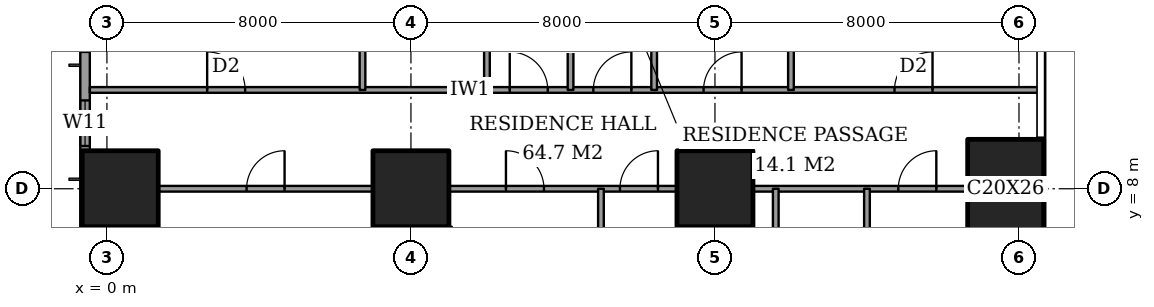
"""IFC4 building model, lengths in metres.
Left out: names, types, materials, properties, quantities, classifications, styles, units other than length and angle.
Written with IfcOpenShell. Run it as: python <this file> out.ifc"""

import sys

from ifc_helpers import new_model, si_unit, direction, frame, frame_2d, origin, origin_2d, place, context, subcontext, project, spatial, rectangle, extrude, element, fill, save


model = new_model("IFC4")
c1 = context("Model", 3, precision=1e-05, world=origin(), true_north=direction((0.0, 1.0)))
c2 = subcontext(c1, "Body", "Model", "MODEL_VIEW")
j1 = project(units=[si_unit("LENGTHUNIT", "METRE"), si_unit("PLANEANGLEUNIT", "RADIAN")], contexts=[c1])
p1 = place(None, origin())
s1 = spatial("IfcSite", under=j1, at=p1, CompositionType="ELEMENT")
p2 = place(p1, origin())
s2 = spatial("IfcBuilding", under=s1, at=p2, CompositionType="ELEMENT")
p3 = place(p2, frame((0.0, 0.0, 135.8)))
s3 = spatial("IfcBuildingStorey", under=s2, at=p3, CompositionType="ELEMENT", Elevation=135.8)
for number, where, z_axis, x_axis in (
    (1, (0.35, 8.0, 0.0), (0.0, 0.0, 1.0), (1.0, 0.0, 0.0)),
    (2, (8.0, 8.0, 0.0), (0.0, 0.0, 1.0), (1.0, 0.0, 0.0)),
    (3, (16.0, 8.0, 0.0), (0.0, 0.0, 1.0), (1.0, 0.0, 0.0)),
):
    element("IfcColumn", number, at=place(p3, frame(where, z_axis=z_axis, x_axis=x_axis)), inside=s3, PredefinedType="COLUMN", context=c2, shape_type="SweptSolid", body=[
        extrude(rectangle(XDim=2.0, YDim=2.0, at=origin_2d()), origin(), (0.0, 0.0, 1.0), 3.6),
    ])
p4 = place(p3, frame((23.65, 8.0, 0.0), z_axis=(0.0, 0.0, 1.0), x_axis=(1.0, 0.0, 0.0)))
e4 = element("IfcColumn", 4, at=p4, inside=s3, PredefinedType="COLUMN", context=c2, shape_type="SweptSolid", body=[
    extrude(rectangle(XDim=2.0, YDim=2.6, at=origin_2d()), origin(), (0.0, 0.0, 1.0), 3.6),
])
p5 = place(p3, frame((-0.575, 44.825, 0.0), z_axis=(0.0, 0.0, 1.0), x_axis=(0.0, -1.0, 0.0)))
e5 = element("IfcWall", 5, at=p5, inside=s3, PredefinedType="SOLIDWALL", context=c2, shape_type="SweptSolid", body=[
    extrude(rectangle(XDim=41.65, YDim=0.25, at=frame_2d((20.825, 0.0))), origin(), (0.0, 0.0, 1.0), 3.6),
])
p6 = place(p5, frame((0.775, 0.0, 0.4)))
e6 = element("IfcOpeningElement", 6, at=p6, cuts=e5, PredefinedType="OPENING", context=c2, shape_type="SweptSolid", body=[
    extrude(rectangle(XDim=2.4, YDim=2.2, at=frame_2d((1.2, 1.1))), frame((0.0, 0.135, 0.0), z_axis=(0.0, -1.0, 0.0), x_axis=(1.0, 0.0, 0.0)), (0.0, 0.0, 1.0), 0.27),
])
p7 = place(p5, frame((6.1, 0.0, 0.4)))
e7 = element("IfcOpeningElement", 7, at=p7, cuts=e5, PredefinedType="OPENING", context=c2, shape_type="SweptSolid", body=[
    extrude(rectangle(XDim=1.2, YDim=2.2, at=frame_2d((0.6, 1.1))), frame((0.0, 0.135, 0.0), z_axis=(0.0, -1.0, 0.0), x_axis=(1.0, 0.0, 0.0)), (0.0, 0.0, 1.0), 0.27),
])
p8 = place(p5, frame((8.425, 0.0, 0.4)))
e8 = element("IfcOpeningElement", 8, at=p8, cuts=e5, PredefinedType="OPENING", context=c2, shape_type="SweptSolid", body=[
    extrude(rectangle(XDim=2.4, YDim=2.2, at=frame_2d((1.2, 1.1))), frame((0.0, 0.135, 0.0), z_axis=(0.0, -1.0, 0.0), x_axis=(1.0, 0.0, 0.0)), (0.0, 0.0, 1.0), 0.27),
])
p9 = place(p5, frame((15.625, 0.0, 0.4)))
e9 = element("IfcOpeningElement", 9, at=p9, cuts=e5, PredefinedType="OPENING", context=c2, shape_type="SweptSolid", body=[
    extrude(rectangle(XDim=2.4, YDim=2.2, at=frame_2d((1.2, 1.1))), frame((0.0, 0.135, 0.0), z_axis=(0.0, -1.0, 0.0), x_axis=(1.0, 0.0, 0.0)), (0.0, 0.0, 1.0), 0.27),
])
p10 = place(p5, frame((23.625, 0.0, 0.4)))
e10 = element("IfcOpeningElement", 10, at=p10, cuts=e5, PredefinedType="OPENING", context=c2, shape_type="SweptSolid", body=[
    extrude(rectangle(XDim=2.4, YDim=2.2, at=frame_2d((1.2, 1.1))), frame((0.0, 0.135, 0.0), z_axis=(0.0, -1.0, 0.0), x_axis=(1.0, 0.0, 0.0)), (0.0, 0.0, 1.0), 0.27),
])
p11 = place(p5, frame((30.825, 0.0, 0.4)))
e11 = element("IfcOpeningElement", 11, at=p11, cuts=e5, PredefinedType="OPENING", context=c2, shape_type="SweptSolid", body=[
    extrude(rectangle(XDim=2.4, YDim=2.2, at=frame_2d((1.2, 1.1))), frame((0.0, 0.135, 0.0), z_axis=(0.0, -1.0, 0.0), x_axis=(1.0, 0.0, 0.0)), (0.0, 0.0, 1.0), 0.27),
])
p12 = place(p5, frame((34.5, 0.0, 0.4)))
e12 = element("IfcOpeningElement", 12, at=p12, cuts=e5, PredefinedType="OPENING", context=c2, shape_type="SweptSolid", body=[
    extrude(rectangle(XDim=1.2, YDim=2.2, at=frame_2d((0.6, 1.1))), frame((0.0, 0.135, 0.0), z_axis=(0.0, -1.0, 0.0), x_axis=(1.0, 0.0, 0.0)), (0.0, 0.0, 1.0), 0.27),
])
p13 = place(p5, frame((38.475, 0.0, 0.4)))
e13 = element("IfcOpeningElement", 13, at=p13, cuts=e5, PredefinedType="OPENING", context=c2, shape_type="SweptSolid", body=[
    extrude(rectangle(XDim=2.4, YDim=2.2, at=frame_2d((1.2, 1.1))), frame((0.0, 0.135, 0.0), z_axis=(0.0, -1.0, 0.0), x_axis=(1.0, 0.0, 0.0)), (0.0, 0.0, 1.0), 0.27),
])
p14 = place(p3, frame((1.35, 8.0, 0.0), z_axis=(0.0, 0.0, 1.0), x_axis=(1.0, 0.0, 0.0)))
e14 = element("IfcWall", 14, at=p14, inside=s3, PredefinedType="PARTITIONING", context=c2, shape_type="SweptSolid", body=[
    extrude(rectangle(XDim=5.65, YDim=0.15, at=frame_2d((2.825, 0.0))), origin(), (0.0, 0.0, 1.0), 3.35),
])
p15 = place(p14, frame((2.325, 0.0, 0.0)))
e15 = element("IfcOpeningElement", 15, at=p15, cuts=e14, PredefinedType="OPENING", context=c2, shape_type="SweptSolid", body=[
    extrude(rectangle(XDim=1.0, YDim=2.1, at=frame_2d((0.5, 1.05))), frame((0.0, 0.085, 0.0), z_axis=(0.0, -1.0, 0.0), x_axis=(1.0, 0.0, 0.0)), (0.0, 0.0, 1.0), 0.17),
])
p16 = place(p3, frame((9.0, 8.0, 0.0), z_axis=(0.0, 0.0, 1.0), x_axis=(1.0, 0.0, 0.0)))
e16 = element("IfcWall", 16, at=p16, inside=s3, PredefinedType="PARTITIONING", context=c2, shape_type="SweptSolid", body=[
    extrude(rectangle(XDim=6.0, YDim=0.15, at=frame_2d((3.0, 0.0))), origin(), (0.0, 0.0, 1.0), 3.35),
])
p17 = place(p16, frame((1.5, 0.0, 0.0)))
e17 = element("IfcOpeningElement", 17, at=p17, cuts=e16, PredefinedType="OPENING", context=c2, shape_type="SweptSolid", body=[
    extrude(rectangle(XDim=1.0, YDim=2.1, at=frame_2d((0.5, 1.05))), frame((0.0, 0.085, 0.0), z_axis=(0.0, -1.0, 0.0), x_axis=(1.0, 0.0, 0.0)), (0.0, 0.0, 1.0), 0.17),
])
p18 = place(p16, frame((4.5, 0.0, 0.0)))
e18 = element("IfcOpeningElement", 18, at=p18, cuts=e16, PredefinedType="OPENING", context=c2, shape_type="SweptSolid", body=[
    extrude(rectangle(XDim=1.0, YDim=2.1, at=frame_2d((0.5, 1.05))), frame((0.0, 0.085, 0.0), z_axis=(0.0, -1.0, 0.0), x_axis=(1.0, 0.0, 0.0)), (0.0, 0.0, 1.0), 0.17),
])
p19 = place(p3, frame((17.0, 8.0, 0.0), z_axis=(0.0, 0.0, 1.0), x_axis=(1.0, 0.0, 0.0)))
e19 = element("IfcWall", 19, at=p19, inside=s3, PredefinedType="PARTITIONING", context=c2, shape_type="SweptSolid", body=[
    extrude(rectangle(XDim=5.65, YDim=0.15, at=frame_2d((2.825, 0.0))), origin(), (0.0, 0.0, 1.0), 3.35),
])
p20 = place(p19, frame((3.825, 0.0, 0.0)))
e20 = element("IfcOpeningElement", 20, at=p20, cuts=e19, PredefinedType="OPENING", context=c2, shape_type="SweptSolid", body=[
    extrude(rectangle(XDim=1.0, YDim=2.1, at=frame_2d((0.5, 1.05))), frame((0.0, 0.085, 0.0), z_axis=(0.0, -1.0, 0.0), x_axis=(1.0, 0.0, 0.0)), (0.0, 0.0, 1.0), 0.17),
])
p21 = place(p3, frame((-0.45, 10.6, 0.0), z_axis=(0.0, 0.0, 1.0), x_axis=(1.0, 0.0, 0.0)))
e21 = element("IfcWall", 21, at=p21, inside=s3, PredefinedType="PARTITIONING", context=c2, shape_type="SweptSolid", body=[
    extrude(rectangle(XDim=25.011, YDim=0.15, at=frame_2d((12.505, 0.0))), origin(), (0.0, 0.0, 1.0), 3.35),
])
p22 = place(p21, frame((13.25, 0.0, 0.0)))
e22 = element("IfcOpeningElement", 22, at=p22, cuts=e21, PredefinedType="OPENING", context=c2, shape_type="SweptSolid", body=[
    extrude(rectangle(XDim=1.0, YDim=2.1, at=frame_2d((0.5, 1.05))), frame((0.0, 0.085, 0.0), z_axis=(0.0, -1.0, 0.0), x_axis=(1.0, 0.0, 0.0)), (0.0, 0.0, 1.0), 0.17),
])
p23 = place(p21, frame((3.087, 0.0, 0.0)))
e23 = element("IfcOpeningElement", 23, at=p23, cuts=e21, PredefinedType="OPENING", context=c2, shape_type="SweptSolid", body=[
    extrude(rectangle(XDim=1.0, YDim=2.1, at=frame_2d((0.5, 1.05))), frame((0.0, 0.085, 0.0), z_axis=(0.0, -1.0, 0.0), x_axis=(1.0, 0.0, 0.0)), (0.0, 0.0, 1.0), 0.17),
])
p24 = place(p21, frame((11.05, 0.0, 0.0)))
e24 = element("IfcOpeningElement", 24, at=p24, cuts=e21, PredefinedType="OPENING", context=c2, shape_type="SweptSolid", body=[
    extrude(rectangle(XDim=1.0, YDim=2.1, at=frame_2d((0.5, 1.05))), frame((0.0, 0.085, 0.0), z_axis=(0.0, -1.0, 0.0), x_axis=(1.0, 0.0, 0.0)), (0.0, 0.0, 1.0), 0.17),
])
p25 = place(p21, frame((16.15, 0.0, 0.0)))
e25 = element("IfcOpeningElement", 25, at=p25, cuts=e21, PredefinedType="OPENING", context=c2, shape_type="SweptSolid", body=[
    extrude(rectangle(XDim=1.0, YDim=2.1, at=frame_2d((0.5, 1.05))), frame((0.0, 0.085, 0.0), z_axis=(0.0, -1.0, 0.0), x_axis=(1.0, 0.0, 0.0)), (0.0, 0.0, 1.0), 0.17),
])
p26 = place(p21, frame((21.175, 0.0, 0.0)))
e26 = element("IfcOpeningElement", 26, at=p26, cuts=e21, PredefinedType="OPENING", context=c2, shape_type="SweptSolid", body=[
    extrude(rectangle(XDim=1.0, YDim=2.1, at=frame_2d((0.5, 1.05))), frame((0.0, 0.085, 0.0), z_axis=(0.0, -1.0, 0.0), x_axis=(1.0, 0.0, 0.0)), (0.0, 0.0, 1.0), 0.17),
])
p27 = place(p3, frame((6.725, 10.6, 0.0), z_axis=(0.0, 0.0, 1.0), x_axis=(0.0, 1.0, 0.0)))
e27 = element("IfcWall", 27, at=p27, inside=s3, PredefinedType="PARTITIONING", context=c2, shape_type="SweptSolid", body=[
    extrude(rectangle(XDim=4.2, YDim=0.15, at=frame_2d((2.1, 0.0))), origin(), (0.0, 0.0, 1.0), 3.35),
])
p28 = place(p27, frame((1.2, 0.0, 0.0)))
e28 = element("IfcOpeningElement", 28, at=p28, cuts=e27, PredefinedType="OPENING", context=c2, shape_type="SweptSolid", body=[
    extrude(rectangle(XDim=0.9, YDim=2.1, at=frame_2d((0.45, 1.05))), frame((0.0, 0.085, 0.0), z_axis=(0.0, -1.0, 0.0), x_axis=(1.0, 0.0, 0.0)), (0.0, 0.0, 1.0), 0.17),
])
p29 = place(p3, frame((10.0, 10.6, 0.0), z_axis=(0.0, 0.0, 1.0), x_axis=(0.0, 1.0, 0.0)))
e29 = element("IfcWall", 29, at=p29, inside=s3, PredefinedType="PARTITIONING", context=c2, shape_type="SweptSolid", body=[
    extrude(rectangle(XDim=11.0, YDim=0.15, at=frame_2d((5.5, 0.0))), origin(), (0.0, 0.0, 1.0), 3.35),
])
p30 = place(p29, frame((8.2, 0.0, 0.0)))
e30 = element("IfcOpeningElement", 30, at=p30, cuts=e29, PredefinedType="OPENING", context=c2, shape_type="SweptSolid", body=[
    extrude(rectangle(XDim=1.0, YDim=2.1, at=frame_2d((0.5, 1.05))), frame((0.0, 0.085, 0.0), z_axis=(0.0, -1.0, 0.0), x_axis=(1.0, 0.0, 0.0)), (0.0, 0.0, 1.0), 0.17),
])
p31 = place(p3, frame((12.2, 10.6, 0.0), z_axis=(0.0, 0.0, 1.0), x_axis=(0.0, 1.0, 0.0)))
e31 = element("IfcWall", 31, at=p31, inside=s3, PredefinedType="PARTITIONING", context=c2, shape_type="SweptSolid", body=[
    extrude(rectangle(XDim=6.4, YDim=0.15, at=frame_2d((3.2, 0.0))), origin(), (0.0, 0.0, 1.0), 3.35),
])
p32 = place(p3, frame((13.0, -0.45, 0.0), z_axis=(0.0, 0.0, 1.0), x_axis=(0.0, 1.0, 0.0)))
e32 = element("IfcWall", 32, at=p32, inside=s3, PredefinedType="PARTITIONING", context=c2, shape_type="SweptSolid", body=[
    extrude(rectangle(XDim=8.45, YDim=0.15, at=frame_2d((4.225, 0.0))), origin(), (0.0, 0.0, 1.0), 3.35),
])
p33 = place(p3, frame((14.4, 10.6, 0.0), z_axis=(0.0, 0.0, 1.0), x_axis=(0.0, 1.0, 0.0)))
e33 = element("IfcWall", 33, at=p33, inside=s3, PredefinedType="PARTITIONING", context=c2, shape_type="SweptSolid", body=[
    extrude(rectangle(XDim=6.4, YDim=0.15, at=frame_2d((3.2, 0.0))), origin(), (0.0, 0.0, 1.0), 3.35),
])
p34 = place(p3, frame((17.6, -0.45, 0.0), z_axis=(0.0, 0.0, 1.0), x_axis=(0.0, 1.0, 0.0)))
e34 = element("IfcWall", 34, at=p34, inside=s3, PredefinedType="PARTITIONING", context=c2, shape_type="SweptSolid", body=[
    extrude(rectangle(XDim=8.45, YDim=0.15, at=frame_2d((4.225, 0.0))), origin(), (0.0, 0.0, 1.0), 3.35),
])
p35 = place(p3, frame((18.0, 10.6, 0.0), z_axis=(0.0, 0.0, 1.0), x_axis=(0.0, 1.0, 0.0)))
e35 = element("IfcWall", 35, at=p35, inside=s3, PredefinedType="PARTITIONING", context=c2, shape_type="SweptSolid", body=[
    extrude(rectangle(XDim=6.4, YDim=0.15, at=frame_2d((3.2, 0.0))), origin(), (0.0, 0.0, 1.0), 3.35),
])
p36 = place(p3, frame((20.0, -0.45, 0.0), z_axis=(0.0, 0.0, 1.0), x_axis=(0.0, 1.0, 0.0)))
e36 = element("IfcWall", 36, at=p36, inside=s3, PredefinedType="PARTITIONING", context=c2, shape_type="SweptSolid", body=[
    extrude(rectangle(XDim=8.45, YDim=0.15, at=frame_2d((4.225, 0.0))), origin(), (0.0, 0.0, 1.0), 3.35),
])
p37 = place(p36, frame((3.775, 0.0, 0.0)))
e37 = element("IfcOpeningElement", 37, at=p37, cuts=e36, PredefinedType="OPENING", context=c2, shape_type="SweptSolid", body=[
    extrude(rectangle(XDim=0.9, YDim=2.1, at=frame_2d((0.45, 1.05))), frame((0.0, 0.085, 0.0), z_axis=(0.0, -1.0, 0.0), x_axis=(1.0, 0.0, 0.0)), (0.0, 0.0, 1.0), 0.17),
])
p38 = place(p12, origin())
e38 = element("IfcWindow", 38, at=p38, inside=s3, PartitioningType="SINGLE_PANEL", PredefinedType="WINDOW", context=c2, shape_type="SweptSolid", body=[
    extrude(rectangle(XDim=1.2, YDim=2.2, at=frame_2d((0.6, 1.1))), frame((0.0, 0.03, 0.0), z_axis=(0.0, -1.0, 0.0), x_axis=(1.0, 0.0, 0.0)), (0.0, 0.0, 1.0), 0.06),
])
fill(e12, e38)
p39 = place(p15, origin())
e39 = element("IfcDoor", 39, at=p39, inside=s3, OperationType="SINGLE_SWING_LEFT", PredefinedType="DOOR", context=c2, shape_type="SweptSolid", body=[
    extrude(rectangle(XDim=1.0, YDim=2.1, at=frame_2d((0.5, 1.05))), frame((0.0, 0.025, 0.0), z_axis=(0.0, -1.0, 0.0), x_axis=(1.0, 0.0, 0.0)), (0.0, 0.0, 1.0), 0.05),
])
fill(e15, e39)
p40 = place(p17, origin())
e40 = element("IfcDoor", 40, at=p40, inside=s3, OperationType="SINGLE_SWING_RIGHT", PredefinedType="DOOR", context=c2, shape_type="SweptSolid", body=[
    extrude(rectangle(XDim=1.0, YDim=2.1, at=frame_2d((0.5, 1.05))), frame((0.0, 0.025, 0.0), z_axis=(0.0, -1.0, 0.0), x_axis=(1.0, 0.0, 0.0)), (0.0, 0.0, 1.0), 0.05),
])
fill(e17, e40)
p41 = place(p18, origin())
e41 = element("IfcDoor", 41, at=p41, inside=s3, OperationType="SINGLE_SWING_LEFT", PredefinedType="DOOR", context=c2, shape_type="SweptSolid", body=[
    extrude(rectangle(XDim=1.0, YDim=2.1, at=frame_2d((0.5, 1.05))), frame((0.0, 0.025, 0.0), z_axis=(0.0, -1.0, 0.0), x_axis=(1.0, 0.0, 0.0)), (0.0, 0.0, 1.0), 0.05),
])
fill(e18, e41)
p42 = place(p20, origin())
e42 = element("IfcDoor", 42, at=p42, inside=s3, OperationType="SINGLE_SWING_LEFT", PredefinedType="DOOR", context=c2, shape_type="SweptSolid", body=[
    extrude(rectangle(XDim=1.0, YDim=2.1, at=frame_2d((0.5, 1.05))), frame((0.0, 0.025, 0.0), z_axis=(0.0, -1.0, 0.0), x_axis=(1.0, 0.0, 0.0)), (0.0, 0.0, 1.0), 0.05),
])
fill(e20, e42)
p43 = place(p22, origin())
e43 = element("IfcDoor", 43, at=p43, inside=s3, OperationType="SINGLE_SWING_LEFT", PredefinedType="DOOR", context=c2, shape_type="SweptSolid", body=[
    extrude(rectangle(XDim=1.0, YDim=2.1, at=frame_2d((0.5, 1.05))), frame((0.0, 0.025, 0.0), z_axis=(0.0, -1.0, 0.0), x_axis=(1.0, 0.0, 0.0)), (0.0, 0.0, 1.0), 0.05),
])
fill(e22, e43)
p44 = place(p23, origin())
e44 = element("IfcDoor", 44, at=p44, inside=s3, OperationType="SINGLE_SWING_RIGHT", PredefinedType="DOOR", context=c2, shape_type="SweptSolid", body=[
    extrude(rectangle(XDim=1.0, YDim=2.1, at=frame_2d((0.5, 1.05))), frame((0.0, 0.025, 0.0), z_axis=(0.0, -1.0, 0.0), x_axis=(1.0, 0.0, 0.0)), (0.0, 0.0, 1.0), 0.05),
])
fill(e23, e44)
p45 = place(p24, origin())
e45 = element("IfcDoor", 45, at=p45, inside=s3, OperationType="SINGLE_SWING_RIGHT", PredefinedType="DOOR", context=c2, shape_type="SweptSolid", body=[
    extrude(rectangle(XDim=1.0, YDim=2.1, at=frame_2d((0.5, 1.05))), frame((0.0, 0.025, 0.0), z_axis=(0.0, -1.0, 0.0), x_axis=(1.0, 0.0, 0.0)), (0.0, 0.0, 1.0), 0.05),
])
fill(e24, e45)
p46 = place(p25, origin())
e46 = element("IfcDoor", 46, at=p46, inside=s3, OperationType="SINGLE_SWING_LEFT", PredefinedType="DOOR", context=c2, shape_type="SweptSolid", body=[
    extrude(rectangle(XDim=1.0, YDim=2.1, at=frame_2d((0.5, 1.05))), frame((0.0, 0.025, 0.0), z_axis=(0.0, -1.0, 0.0), x_axis=(1.0, 0.0, 0.0)), (0.0, 0.0, 1.0), 0.05),
])
fill(e25, e46)
p47 = place(p26, origin())
e47 = element("IfcDoor", 47, at=p47, inside=s3, OperationType="SINGLE_SWING_LEFT", PredefinedType="DOOR", context=c2, shape_type="SweptSolid", body=[
    extrude(rectangle(XDim=1.0, YDim=2.1, at=frame_2d((0.5, 1.05))), frame((0.0, 0.025, 0.0), z_axis=(0.0, -1.0, 0.0), x_axis=(1.0, 0.0, 0.0)), (0.0, 0.0, 1.0), 0.05),
])
fill(e26, e47)
save(model, sys.argv[1])
